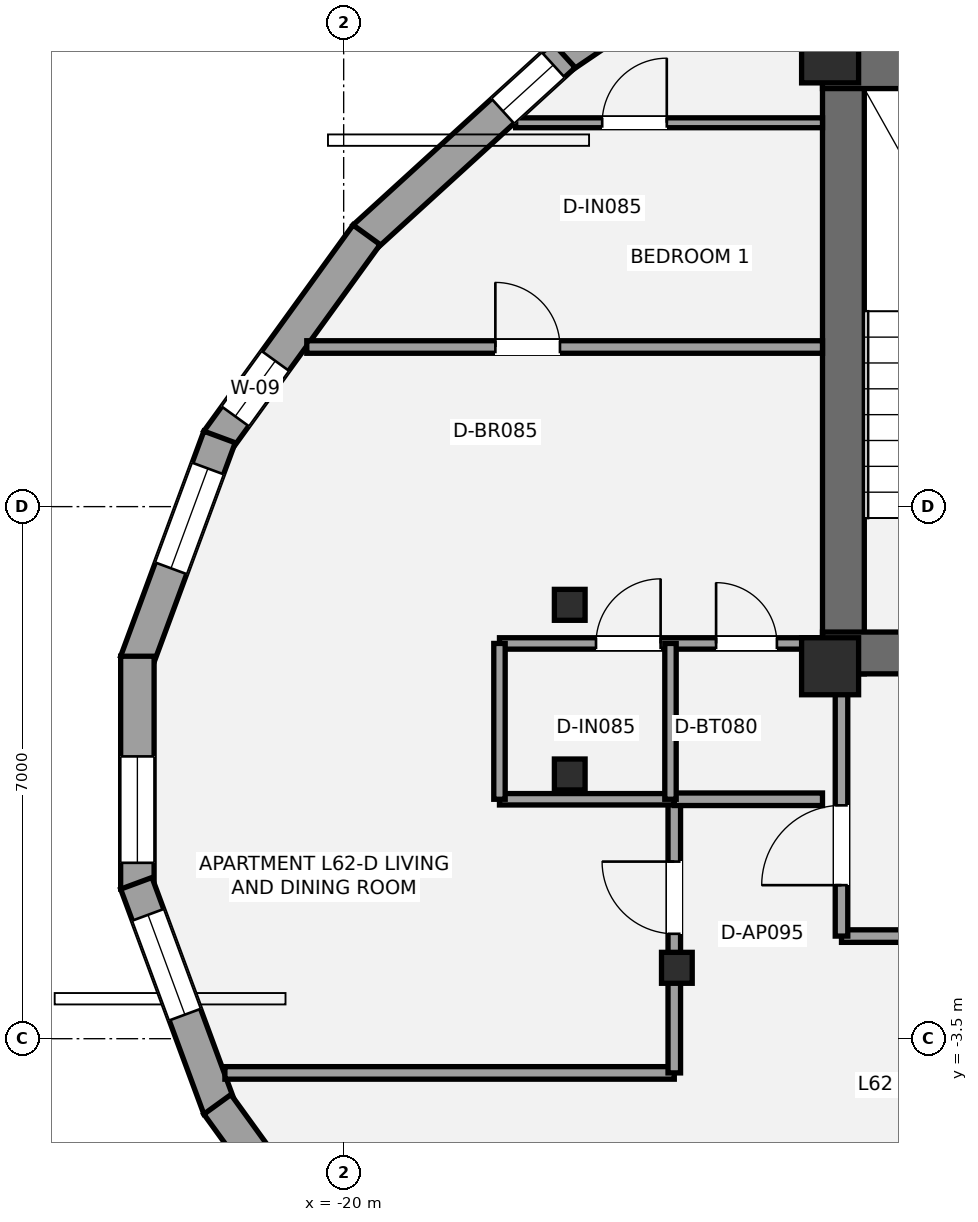
"""IFC4 building model, lengths in metres.
Left out: names, types, materials, properties, quantities, classifications, styles, units other than length and angle.
Written with IfcOpenShell. Run it as: python <this file> out.ifc"""

import sys

from ifc_helpers import new_model, si_unit, direction, frame, frame_2d, origin, origin_2d, place, context, subcontext, project, spatial, rectangle, i_section, extrude, element, fill, save


model = new_model("IFC4")
c1 = context("Model", 3, precision=1e-05, world=origin(), true_north=direction((0.0, 1.0)))
c2 = subcontext(c1, "Body", "Model", "MODEL_VIEW")
j1 = project(units=[si_unit("LENGTHUNIT", "METRE"), si_unit("PLANEANGLEUNIT", "RADIAN")], contexts=[c1])
p1 = place(None, origin())
s1 = spatial("IfcSite", under=j1, at=p1, CompositionType="ELEMENT")
p2 = place(p1, origin())
s2 = spatial("IfcBuilding", under=s1, at=p2, CompositionType="ELEMENT")
p3 = place(p2, frame((0.0, 0.0, 222.6)))
s3 = spatial("IfcBuildingStorey", under=s2, at=p3, CompositionType="ELEMENT", Elevation=222.6)
p4 = place(p3, frame((-13.425, 1.3, 0.0), z_axis=(0.0, 0.0, 1.0), x_axis=(0.0, 1.0, 0.0)))
e1 = element("IfcWall", 1, at=p4, inside=s3, PredefinedType="SHEAR", context=c2, shape_type="SweptSolid", body=[
    extrude(rectangle(XDim=8.25, YDim=0.55, at=frame_2d((4.125, 0.0))), origin(), (0.0, 0.0, 1.0), 3.15),
])
p5 = place(p3, frame((-13.7, 9.275, 0.0), z_axis=(0.0, 0.0, 1.0), x_axis=(1.0, 0.0, 0.0)))
e2 = element("IfcWall", 2, at=p5, inside=s3, PredefinedType="SHEAR", context=c2, shape_type="SweptSolid", body=[
    extrude(rectangle(XDim=9.175, YDim=0.55, at=frame_2d((4.587, 0.0))), origin(), (0.0, 0.0, 1.0), 3.15),
])
p6 = place(p3, frame((-4.925, 1.575, 0.0), z_axis=(0.0, 0.0, 1.0), x_axis=(-1.0, 0.0, 0.0)))
e3 = element("IfcWall", 3, at=p6, inside=s3, PredefinedType="SHEAR", context=c2, shape_type="SweptSolid", body=[
    extrude(rectangle(XDim=8.775, YDim=0.55, at=frame_2d((4.387, 0.0))), origin(), (0.0, 0.0, 1.0), 3.15),
])
p7 = place(p6, frame((5.375, 0.0, 0.0)))
e4 = element("IfcOpeningElement", 4, at=p7, cuts=e3, PredefinedType="OPENING", context=c2, shape_type="SweptSolid", body=[
    extrude(rectangle(XDim=1.05, YDim=2.15, at=frame_2d((0.525, 1.075))), frame((0.0, 0.285, 0.0), z_axis=(0.0, -1.0, 0.0), x_axis=(1.0, 0.0, 0.0)), (0.0, 0.0, 1.0), 0.57),
])
p8 = place(p6, frame((3.705, 0.0, 0.0)))
e5 = element("IfcOpeningElement", 5, at=p8, cuts=e3, PredefinedType="OPENING", context=c2, shape_type="SweptSolid", body=[
    extrude(rectangle(XDim=1.1, YDim=2.2, at=frame_2d((0.55, 1.1))), frame((0.0, 0.285, 0.0), z_axis=(0.0, -1.0, 0.0), x_axis=(1.0, 0.0, 0.0)), (0.0, 0.0, 1.0), 0.57),
])
for number, where, z_axis, x_axis in (
    (6, (-13.6, 1.4, 0.0), (0.0, 0.0, 1.0), (1.0, 0.0, 0.0)),
    (7, (-13.6, 9.45, 0.0), (0.0, 0.0, 1.0), (1.0, 0.0, 0.0)),
):
    element("IfcColumn", number, at=place(p3, frame(where, z_axis=z_axis, x_axis=x_axis)), inside=s3, PredefinedType="PILASTER", context=c2, shape_type="SweptSolid", body=[
        extrude(rectangle(XDim=0.75, YDim=0.75, at=origin_2d()), origin(), (0.0, 0.0, 1.0), 3.15),
    ])
for number, where, z_axis, x_axis in (
    (8, (-17.026, 2.208, 0.0), (0.0, 0.0, 1.0), (1.0, 0.0, 0.0)),
    (9, (-17.026, -0.024, 0.0), (0.0, 0.0, 1.0), (1.0, 0.0, 0.0)),
    (10, (-15.616, -2.567, 0.0), (0.0, 0.0, 1.0), (1.0, 0.0, 0.0)),
):
    element("IfcColumn", number, at=place(p3, frame(where, z_axis=z_axis, x_axis=x_axis)), inside=s3, PredefinedType="COLUMN", context=c2, shape_type="SweptSolid", body=[
        extrude(i_section(OverallWidth=0.404, OverallDepth=0.407, WebThickness=0.027, FlangeThickness=0.044, at=origin_2d()), origin(), (0.0, 0.0, 1.0), 3.15),
    ])
p9 = place(p3, frame((-17.126, 9.419, 0.0), z_axis=(0.0, 0.0, 1.0), x_axis=(0.827642668093, 0.561255391023, 0.0)))
e11 = element("IfcWall", 11, at=p9, inside=s3, PredefinedType="STANDARD", context=c2, shape_type="SweptSolid", body=[
    extrude(rectangle(XDim=3.738, YDim=0.44, at=frame_2d((1.869, 0.0))), origin(), (0.0, 0.0, 1.0), 2.336),
])
p10 = place(p9, frame((0.498, 0.0, 0.55)))
e12 = element("IfcOpeningElement", 12, at=p10, cuts=e11, PredefinedType="OPENING", context=c2, shape_type="SweptSolid", body=[
    extrude(rectangle(XDim=1.75, YDim=1.55, at=frame_2d((0.875, 0.775))), frame((0.0, 0.23, 0.0), z_axis=(0.0, -1.0, 0.0), x_axis=(1.0, 0.0, 0.0)), (0.0, 0.0, 1.0), 0.46),
])
p11 = place(p3, frame((-19.728, 7.042, 0.0), z_axis=(0.0, 0.0, 1.0), x_axis=(0.738907573949, 0.673806795129, 0.0)))
e13 = element("IfcWall", 13, at=p11, inside=s3, PredefinedType="STANDARD", context=c2, shape_type="SweptSolid", body=[
    extrude(rectangle(XDim=3.555, YDim=0.44, at=frame_2d((1.778, 0.0))), origin(), (0.0, 0.0, 1.0), 2.336),
])
p12 = place(p11, frame((2.466, 0.0, 0.58)))
e14 = element("IfcOpeningElement", 14, at=p12, cuts=e13, PredefinedType="OPENING", context=c2, shape_type="SweptSolid", body=[
    extrude(rectangle(XDim=0.9, YDim=1.35, at=frame_2d((0.45, 0.675))), frame((0.0, 0.23, 0.0), z_axis=(0.0, -1.0, 0.0), x_axis=(1.0, 0.0, 0.0)), (0.0, 0.0, 1.0), 0.46),
])
p13 = place(p3, frame((-21.661, 4.364, 0.0), z_axis=(0.0, 0.0, 1.0), x_axis=(0.586344849721, 0.810061551492, 0.0)))
e15 = element("IfcWall", 15, at=p13, inside=s3, PredefinedType="STANDARD", context=c2, shape_type="SweptSolid", body=[
    extrude(rectangle(XDim=3.348, YDim=0.44, at=frame_2d((1.674, 0.0))), origin(), (0.0, 0.0, 1.0), 2.336),
])
p14 = place(p13, frame((0.4, 0.0, 0.58)))
e16 = element("IfcOpeningElement", 16, at=p14, cuts=e15, PredefinedType="OPENING", context=c2, shape_type="SweptSolid", body=[
    extrude(rectangle(XDim=0.9, YDim=1.35, at=frame_2d((0.45, 0.675))), frame((0.0, 0.23, 0.0), z_axis=(0.0, -1.0, 0.0), x_axis=(1.0, 0.0, 0.0)), (0.0, 0.0, 1.0), 0.46),
])
p15 = place(p3, frame((-22.728, 1.456, 0.0), z_axis=(0.0, 0.0, 1.0), x_axis=(0.346755155412, 0.937955682426, 0.0)))
e17 = element("IfcWall", 17, at=p15, inside=s3, PredefinedType="STANDARD", context=c2, shape_type="SweptSolid", body=[
    extrude(rectangle(XDim=3.157, YDim=0.44, at=frame_2d((1.579, 0.0))), origin(), (0.0, 0.0, 1.0), 2.336),
])
p16 = place(p15, frame((1.315, 0.0, 0.58)))
e18 = element("IfcOpeningElement", 18, at=p16, cuts=e17, PredefinedType="OPENING", context=c2, shape_type="SweptSolid", body=[
    extrude(rectangle(XDim=1.4, YDim=1.55, at=frame_2d((0.7, 0.775))), frame((0.0, 0.23, 0.0), z_axis=(0.0, -1.0, 0.0), x_axis=(1.0, 0.0, 0.0)), (0.0, 0.0, 1.0), 0.46),
])
p17 = place(p3, frame((-22.714, -1.532, 0.0), z_axis=(0.0, 0.0, 1.0), x_axis=(0.0, 1.0, 0.0)))
e19 = element("IfcWall", 19, at=p17, inside=s3, PredefinedType="STANDARD", context=c2, shape_type="SweptSolid", body=[
    extrude(rectangle(XDim=3.064, YDim=0.44, at=frame_2d((1.532, 0.0))), origin(), (0.0, 0.0, 1.0), 2.336),
])
p18 = place(p17, frame((0.346, 0.0, 0.55)))
e20 = element("IfcOpeningElement", 20, at=p18, cuts=e19, PredefinedType="OPENING", context=c2, shape_type="SweptSolid", body=[
    extrude(rectangle(XDim=1.4, YDim=1.55, at=frame_2d((0.7, 0.775))), frame((0.0, 0.23, 0.0), z_axis=(0.0, -1.0, 0.0), x_axis=(1.0, 0.0, 0.0)), (0.0, 0.0, 1.0), 0.46),
])
p19 = place(p3, frame((-21.633, -4.417, 0.0), z_axis=(0.0, 0.0, 1.0), x_axis=(-0.346755155412, 0.937955682426, 0.0)))
e21 = element("IfcWall", 21, at=p19, inside=s3, PredefinedType="STANDARD", context=c2, shape_type="SweptSolid", body=[
    extrude(rectangle(XDim=3.157, YDim=0.44, at=frame_2d((1.579, 0.0))), origin(), (0.0, 0.0, 1.0), 2.336),
])
p20 = place(p19, frame((1.315, 0.0, 0.58)))
e22 = element("IfcOpeningElement", 22, at=p20, cuts=e21, PredefinedType="OPENING", context=c2, shape_type="SweptSolid", body=[
    extrude(rectangle(XDim=1.4, YDim=1.55, at=frame_2d((0.7, 0.775))), frame((0.0, 0.23, 0.0), z_axis=(0.0, -1.0, 0.0), x_axis=(1.0, 0.0, 0.0)), (0.0, 0.0, 1.0), 0.46),
])
p21 = place(p3, frame((-19.698, -7.076, 0.0), z_axis=(0.0, 0.0, 1.0), x_axis=(-0.586344849721, 0.810061551492, 0.0)))
e23 = element("IfcWall", 23, at=p21, inside=s3, PredefinedType="STANDARD", context=c2, shape_type="SweptSolid", body=[
    extrude(rectangle(XDim=3.348, YDim=0.44, at=frame_2d((1.674, 0.0))), origin(), (0.0, 0.0, 1.0), 2.336),
])
p22 = place(p3, frame((-13.45, -2.15, 0.0), z_axis=(0.0, 0.0, 1.0), x_axis=(1.0, 0.0, 0.0)))
e24 = element("IfcWall", 24, at=p22, inside=s3, PredefinedType="PARTITIONING", context=c2, shape_type="SweptSolid", body=[
    extrude(rectangle(XDim=6.25, YDim=0.165, at=frame_2d((3.125, 0.0))), origin(), (0.0, 0.0, 1.0), 2.423),
])
p23 = place(p3, frame((-13.45, -2.15, 0.0), z_axis=(0.0, 0.0, 1.0), x_axis=(0.0, 1.0, 0.0)))
e25 = element("IfcWall", 25, at=p23, inside=s3, PredefinedType="PARTITIONING", context=c2, shape_type="SweptSolid", body=[
    extrude(rectangle(XDim=3.5, YDim=0.165, at=frame_2d((1.75, 0.0))), origin(), (0.0, 0.0, 1.0), 2.423),
])
p24 = place(p23, frame((0.67, 0.0, 0.0)))
e26 = element("IfcOpeningElement", 26, at=p24, cuts=e25, PredefinedType="OPENING", context=c2, shape_type="SweptSolid", body=[
    extrude(rectangle(XDim=1.05, YDim=2.15, at=frame_2d((0.525, 1.075))), frame((0.0, 0.093, 0.0), z_axis=(0.0, -1.0, 0.0), x_axis=(1.0, 0.0, 0.0)), (0.0, 0.0, 1.0), 0.185),
])
p25 = place(p3, frame((-21.562, -3.95, 0.0), z_axis=(0.0, 0.0, 1.0), x_axis=(1.0, 0.0, 0.0)))
e27 = element("IfcWall", 27, at=p25, inside=s3, PredefinedType="PARTITIONING", context=c2, shape_type="SweptSolid", body=[
    extrude(rectangle(XDim=5.913, YDim=0.165, at=frame_2d((2.956, 0.0))), origin(), (0.0, 0.0, 1.0), 2.423),
])
p26 = place(p3, frame((-15.65, -3.95, 0.0), z_axis=(0.0, 0.0, 1.0), x_axis=(0.0, 1.0, 0.0)))
e28 = element("IfcWall", 28, at=p26, inside=s3, PredefinedType="PARTITIONING", context=c2, shape_type="SweptSolid", body=[
    extrude(rectangle(XDim=3.6, YDim=0.165, at=frame_2d((1.8, 0.0))), origin(), (0.0, 0.0, 1.0), 2.357),
])
p27 = place(p26, frame((1.83, 0.0, 0.0)))
e29 = element("IfcOpeningElement", 29, at=p27, cuts=e28, PredefinedType="OPENING", context=c2, shape_type="SweptSolid", body=[
    extrude(rectangle(XDim=0.95, YDim=2.15, at=frame_2d((0.475, 1.075))), frame((0.0, 0.093, 0.0), z_axis=(0.0, -1.0, 0.0), x_axis=(1.0, 0.0, 0.0)), (0.0, 0.0, 1.0), 0.185),
])
p28 = place(p3, frame((-15.65, -0.35, 0.0), z_axis=(0.0, 0.0, 1.0), x_axis=(1.0, 0.0, 0.0)))
e30 = element("IfcWall", 30, at=p28, inside=s3, PredefinedType="PARTITIONING", context=c2, shape_type="SweptSolid", body=[
    extrude(rectangle(XDim=1.95, YDim=0.165, at=frame_2d((0.975, 0.0))), origin(), (0.0, 0.0, 1.0), 2.97),
])
p29 = place(p3, frame((-20.485, 5.6, 0.0), z_axis=(0.0, 0.0, 1.0), x_axis=(1.0, 0.0, 0.0)))
e31 = element("IfcWall", 31, at=p29, inside=s3, PredefinedType="PARTITIONING", context=c2, shape_type="SweptSolid", body=[
    extrude(rectangle(XDim=6.785, YDim=0.165, at=frame_2d((3.393, 0.0))), origin(), (0.0, 0.0, 1.0), 2.423),
])
p30 = place(p29, frame((2.481, 0.0, 0.0)))
e32 = element("IfcOpeningElement", 32, at=p30, cuts=e31, PredefinedType="OPENING", context=c2, shape_type="SweptSolid", body=[
    extrude(rectangle(XDim=0.85, YDim=2.1, at=frame_2d((0.425, 1.05))), frame((0.0, 0.093, 0.0), z_axis=(0.0, -1.0, 0.0), x_axis=(1.0, 0.0, 0.0)), (0.0, 0.0, 1.0), 0.185),
])
p31 = place(p3, frame((-17.95, 1.7, 0.0), z_axis=(0.0, 0.0, 1.0), x_axis=(1.0, 0.0, 0.0)))
e33 = element("IfcWall", 33, at=p31, inside=s3, PredefinedType="PLUMBINGWALL", context=c2, shape_type="SweptSolid", body=[
    extrude(rectangle(XDim=4.25, YDim=0.15, at=frame_2d((2.125, 0.0))), origin(), (0.0, 0.0, 1.0), 2.423),
])
p32 = place(p31, frame((2.85, 0.0, 0.0)))
e34 = element("IfcOpeningElement", 34, at=p32, cuts=e33, PredefinedType="OPENING", context=c2, shape_type="SweptSolid", body=[
    extrude(rectangle(XDim=0.8, YDim=2.1, at=frame_2d((0.4, 1.05))), frame((0.0, 0.085, 0.0), z_axis=(0.0, -1.0, 0.0), x_axis=(1.0, 0.0, 0.0)), (0.0, 0.0, 1.0), 0.17),
])
p33 = place(p31, frame((1.27, 0.0, 0.0)))
e35 = element("IfcOpeningElement", 35, at=p33, cuts=e33, PredefinedType="OPENING", context=c2, shape_type="SweptSolid", body=[
    extrude(rectangle(XDim=0.85, YDim=2.1, at=frame_2d((0.425, 1.05))), frame((0.0, 0.085, 0.0), z_axis=(0.0, -1.0, 0.0), x_axis=(1.0, 0.0, 0.0)), (0.0, 0.0, 1.0), 0.17),
])
p34 = place(p3, frame((-17.95, -0.35, 0.0), z_axis=(0.0, 0.0, 1.0), x_axis=(1.0, 0.0, 0.0)))
e36 = element("IfcWall", 36, at=p34, inside=s3, PredefinedType="PLUMBINGWALL", context=c2, shape_type="SweptSolid", body=[
    extrude(rectangle(XDim=2.3, YDim=0.15, at=frame_2d((1.15, 0.0))), origin(), (0.0, 0.0, 1.0), 2.423),
])
p35 = place(p3, frame((-15.7, -0.35, 0.0), z_axis=(0.0, 0.0, 1.0), x_axis=(0.0, 1.0, 0.0)))
e37 = element("IfcWall", 37, at=p35, inside=s3, PredefinedType="PLUMBINGWALL", context=c2, shape_type="SweptSolid", body=[
    extrude(rectangle(XDim=2.05, YDim=0.15, at=frame_2d((1.025, 0.0))), origin(), (0.0, 0.0, 1.0), 2.97),
])
p36 = place(p3, frame((-17.95, -0.35, 0.0), z_axis=(0.0, 0.0, 1.0), x_axis=(0.0, 1.0, 0.0)))
e38 = element("IfcWall", 38, at=p36, inside=s3, PredefinedType="PLUMBINGWALL", context=c2, shape_type="SweptSolid", body=[
    extrude(rectangle(XDim=2.05, YDim=0.15, at=frame_2d((1.025, 0.0))), origin(), (0.0, 0.0, 1.0), 2.423),
])
p37 = place(p3, frame((-17.737, 8.55, 0.0), z_axis=(0.0, 0.0, 1.0), x_axis=(1.0, 0.0, 0.0)))
e39 = element("IfcWall", 39, at=p37, inside=s3, PredefinedType="PARTITIONING", context=c2, shape_type="SweptSolid", body=[
    extrude(rectangle(XDim=4.037, YDim=0.13, at=frame_2d((2.019, 0.0))), origin(), (0.0, 0.0, 1.0), 2.423),
])
p38 = place(p37, frame((1.138, 0.0, 0.0)))
e40 = element("IfcOpeningElement", 40, at=p38, cuts=e39, PredefinedType="OPENING", context=c2, shape_type="SweptSolid", body=[
    extrude(rectangle(XDim=0.85, YDim=2.1, at=frame_2d((0.425, 1.05))), frame((0.0, 0.075, 0.0), z_axis=(0.0, -1.0, 0.0), x_axis=(1.0, 0.0, 0.0)), (0.0, 0.0, 1.0), 0.15),
])
p39 = place(p14, origin())
e41 = element("IfcWindow", 41, at=p39, inside=s3, PartitioningType="SINGLE_PANEL", PredefinedType="WINDOW", context=c2, shape_type="SweptSolid", body=[
    extrude(rectangle(XDim=0.9, YDim=1.35, at=frame_2d((0.45, 0.675))), frame((0.0, -0.01, 0.0), z_axis=(0.0, -1.0, 0.0), x_axis=(1.0, 0.0, 0.0)), (0.0, 0.0, 1.0), 0.06),
])
fill(e16, e41)
p40 = place(p16, origin())
e42 = element("IfcWindow", 42, at=p40, inside=s3, PartitioningType="SINGLE_PANEL", PredefinedType="WINDOW", context=c2, shape_type="SweptSolid", body=[
    extrude(rectangle(XDim=1.4, YDim=1.55, at=frame_2d((0.7, 0.775))), frame((0.0, -0.01, 0.0), z_axis=(0.0, -1.0, 0.0), x_axis=(1.0, 0.0, 0.0)), (0.0, 0.0, 1.0), 0.06),
])
fill(e18, e42)
p41 = place(p18, origin())
e43 = element("IfcWindow", 43, at=p41, inside=s3, PartitioningType="SINGLE_PANEL", PredefinedType="WINDOW", context=c2, shape_type="SweptSolid", body=[
    extrude(rectangle(XDim=1.4, YDim=1.55, at=frame_2d((0.7, 0.775))), frame((0.0, -0.01, 0.0), z_axis=(0.0, -1.0, 0.0), x_axis=(1.0, 0.0, 0.0)), (0.0, 0.0, 1.0), 0.06),
])
fill(e20, e43)
p42 = place(p20, origin())
e44 = element("IfcWindow", 44, at=p42, inside=s3, PartitioningType="SINGLE_PANEL", PredefinedType="WINDOW", context=c2, shape_type="SweptSolid", body=[
    extrude(rectangle(XDim=1.4, YDim=1.55, at=frame_2d((0.7, 0.775))), frame((0.0, -0.01, 0.0), z_axis=(0.0, -1.0, 0.0), x_axis=(1.0, 0.0, 0.0)), (0.0, 0.0, 1.0), 0.06),
])
fill(e22, e44)
p43 = place(p12, origin())
e45 = element("IfcWindow", 45, at=p43, inside=s3, PartitioningType="SINGLE_PANEL", PredefinedType="WINDOW", context=c2, shape_type="SweptSolid", body=[
    extrude(rectangle(XDim=0.9, YDim=1.35, at=frame_2d((0.45, 0.675))), frame((0.0, -0.01, 0.0), z_axis=(0.0, -1.0, 0.0), x_axis=(1.0, 0.0, 0.0)), (0.0, 0.0, 1.0), 0.06),
])
fill(e14, e45)
p44 = place(p24, origin())
e46 = element("IfcDoor", 46, at=p44, inside=s3, OperationType="SINGLE_SWING_LEFT", PredefinedType="DOOR", context=c2, shape_type="SweptSolid", body=[
    extrude(rectangle(XDim=1.05, YDim=2.15, at=frame_2d((0.525, 1.075))), frame((0.0, 0.025, 0.0), z_axis=(0.0, -1.0, 0.0), x_axis=(1.0, 0.0, 0.0)), (0.0, 0.0, 1.0), 0.05),
])
fill(e26, e46)
p45 = place(p27, origin())
e47 = element("IfcDoor", 47, at=p45, inside=s3, OperationType="SINGLE_SWING_RIGHT", PredefinedType="DOOR", context=c2, shape_type="SweptSolid", body=[
    extrude(rectangle(XDim=0.95, YDim=2.15, at=frame_2d((0.475, 1.075))), frame((0.0, 0.025, 0.0), z_axis=(0.0, -1.0, 0.0), x_axis=(1.0, 0.0, 0.0)), (0.0, 0.0, 1.0), 0.05),
])
fill(e29, e47)
p46 = place(p32, origin())
e48 = element("IfcDoor", 48, at=p46, inside=s3, OperationType="SINGLE_SWING_LEFT", PredefinedType="DOOR", context=c2, shape_type="SweptSolid", body=[
    extrude(rectangle(XDim=0.8, YDim=2.1, at=frame_2d((0.4, 1.05))), frame((0.0, 0.025, 0.0), z_axis=(0.0, -1.0, 0.0), x_axis=(1.0, 0.0, 0.0)), (0.0, 0.0, 1.0), 0.05),
])
fill(e34, e48)
p47 = place(p33, origin())
e49 = element("IfcDoor", 49, at=p47, inside=s3, OperationType="SINGLE_SWING_RIGHT", PredefinedType="DOOR", context=c2, shape_type="SweptSolid", body=[
    extrude(rectangle(XDim=0.85, YDim=2.1, at=frame_2d((0.425, 1.05))), frame((0.0, 0.025, 0.0), z_axis=(0.0, -1.0, 0.0), x_axis=(1.0, 0.0, 0.0)), (0.0, 0.0, 1.0), 0.05),
])
fill(e35, e49)
p48 = place(p30, origin())
e50 = element("IfcDoor", 50, at=p48, inside=s3, OperationType="SINGLE_SWING_LEFT", PredefinedType="DOOR", context=c2, shape_type="SweptSolid", body=[
    extrude(rectangle(XDim=0.85, YDim=2.1, at=frame_2d((0.425, 1.05))), frame((0.0, 0.025, 0.0), z_axis=(0.0, -1.0, 0.0), x_axis=(1.0, 0.0, 0.0)), (0.0, 0.0, 1.0), 0.05),
])
fill(e32, e50)
p49 = place(p38, origin())
e51 = element("IfcDoor", 51, at=p49, inside=s3, OperationType="SINGLE_SWING_RIGHT", PredefinedType="DOOR", context=c2, shape_type="SweptSolid", body=[
    extrude(rectangle(XDim=0.85, YDim=2.1, at=frame_2d((0.425, 1.05))), frame((0.0, 0.025, 0.0), z_axis=(0.0, -1.0, 0.0), x_axis=(1.0, 0.0, 0.0)), (0.0, 0.0, 1.0), 0.05),
])
fill(e40, e51)
save(model, sys.argv[1])
